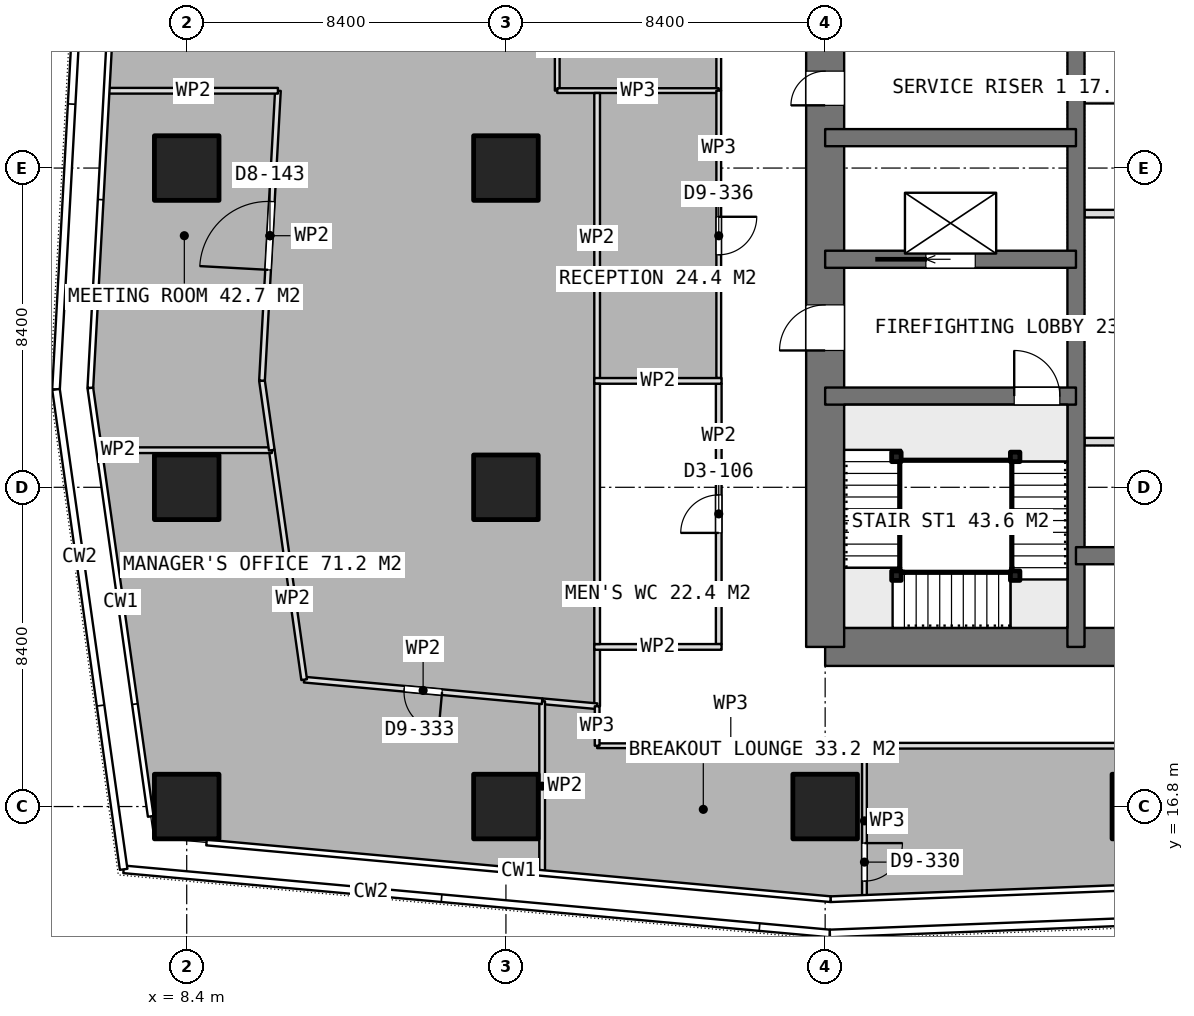
"""IFC4 building model, lengths in metres.
Left out: names, types, materials, properties, quantities, classifications, styles, units other than length and angle.
Written with IfcOpenShell. Run it as: python <this file> out.ifc"""

import sys

from ifc_helpers import new_model, si_unit, direction, frame, frame_2d, origin, origin_2d, place, context, subcontext, project, spatial, rectangle, extrude, element, fill, save


model = new_model("IFC4")
c1 = context("Model", 3, precision=1e-05, world=origin(), true_north=direction((0.0, 1.0)))
c2 = subcontext(c1, "Body", "Model", "MODEL_VIEW")
j1 = project(units=[si_unit("LENGTHUNIT", "METRE"), si_unit("PLANEANGLEUNIT", "RADIAN")], contexts=[c1])
p1 = place(None, origin())
s1 = spatial("IfcSite", under=j1, at=p1, CompositionType="ELEMENT")
p2 = place(p1, origin())
s2 = spatial("IfcBuilding", under=s1, at=p2, CompositionType="ELEMENT")
p3 = place(p2, frame((0.0, 0.0, 102.8)))
s3 = spatial("IfcBuildingStorey", under=s2, at=p3, CompositionType="ELEMENT", Elevation=102.8)
p4 = place(p3, frame((25.2, 21.0, 0.0), z_axis=(0.0, 0.0, 1.0), x_axis=(1.0, 0.0, 0.0)))
e1 = element("IfcWall", 1, at=p4, inside=s3, PredefinedType="SHEAR", context=c2, shape_type="SweptSolid", body=[
    extrude(rectangle(XDim=10.4, YDim=1.0, at=frame_2d((5.2, 0.0))), origin(), (0.0, 0.0, 1.0), 3.75),
])
p5 = place(p3, frame((25.2, 21.0, 0.0), z_axis=(0.0, 0.0, 1.0), x_axis=(0.0, 1.0, 0.0)))
e2 = element("IfcWall", 2, at=p5, inside=s3, PredefinedType="SHEAR", context=c2, shape_type="SweptSolid", body=[
    extrude(rectangle(XDim=25.2, YDim=1.0, at=frame_2d((12.6, 0.0))), origin(), (0.0, 0.0, 1.0), 3.75),
])
p6 = place(p5, frame((7.8, 0.0, 0.0)))
e3 = element("IfcOpeningElement", 3, at=p6, cuts=e2, PredefinedType="OPENING", context=c2, shape_type="SweptSolid", body=[
    extrude(rectangle(XDim=1.2, YDim=2.1, at=frame_2d((0.6, 1.05))), frame((0.0, 0.51, 0.0), z_axis=(0.0, -1.0, 0.0), x_axis=(1.0, 0.0, 0.0)), (0.0, 0.0, 1.0), 1.02),
])
p7 = place(p5, frame((14.25, 0.0, 0.0)))
e4 = element("IfcOpeningElement", 4, at=p7, cuts=e2, PredefinedType="OPENING", context=c2, shape_type="SweptSolid", body=[
    extrude(rectangle(XDim=0.9, YDim=2.1, at=frame_2d((0.45, 1.05))), frame((0.0, 0.51, 0.0), z_axis=(0.0, -1.0, 0.0), x_axis=(1.0, 0.0, 0.0)), (0.0, 0.0, 1.0), 1.02),
])
p8 = place(p5, frame((16.85, 0.0, 0.0)))
e5 = element("IfcOpeningElement", 5, at=p8, cuts=e2, PredefinedType="OPENING", context=c2, shape_type="SweptSolid", body=[
    extrude(rectangle(XDim=0.9, YDim=2.1, at=frame_2d((0.45, 1.05))), frame((0.0, 0.51, 0.0), z_axis=(0.0, -1.0, 0.0), x_axis=(1.0, 0.0, 0.0)), (0.0, 0.0, 1.0), 1.02),
])
p9 = place(p5, frame((19.025, 0.0, 0.0)))
e6 = element("IfcOpeningElement", 6, at=p9, cuts=e2, PredefinedType="OPENING", context=c2, shape_type="SweptSolid", body=[
    extrude(rectangle(XDim=1.2, YDim=2.1, at=frame_2d((0.6, 1.05))), frame((0.0, 0.51, 0.0), z_axis=(0.0, -1.0, 0.0), x_axis=(1.0, 0.0, 0.0)), (0.0, 0.0, 1.0), 1.02),
])
p10 = place(p3, frame((31.8, 21.0, 0.0), z_axis=(0.0, 0.0, 1.0), x_axis=(0.0, 1.0, 0.0)))
e7 = element("IfcWall", 7, at=p10, inside=s3, PredefinedType="SHEAR", context=c2, shape_type="SweptSolid", body=[
    extrude(rectangle(XDim=25.2, YDim=0.45, at=frame_2d((12.6, 0.0))), origin(), (0.0, 0.0, 1.0), 3.75),
])
p11 = place(p3, frame((31.8, 23.4, 0.0), z_axis=(0.0, 0.0, 1.0), x_axis=(1.0, 0.0, 0.0)))
e8 = element("IfcWall", 8, at=p11, inside=s3, PredefinedType="SHEAR", context=c2, shape_type="SweptSolid", body=[
    extrude(rectangle(XDim=3.8, YDim=0.45, at=frame_2d((1.9, 0.0))), origin(), (0.0, 0.0, 1.0), 3.75),
])
p12 = place(p3, frame((25.2, 27.6, 0.0), z_axis=(0.0, 0.0, 1.0), x_axis=(1.0, 0.0, 0.0)))
e9 = element("IfcWall", 9, at=p12, inside=s3, PredefinedType="SHEAR", context=c2, shape_type="SweptSolid", body=[
    extrude(rectangle(XDim=6.6, YDim=0.45, at=frame_2d((3.3, 0.0))), origin(), (0.0, 0.0, 1.0), 3.75),
])
p13 = place(p12, frame((4.975, 0.0, 0.0)))
e10 = element("IfcOpeningElement", 10, at=p13, cuts=e9, PredefinedType="OPENING", context=c2, shape_type="SweptSolid", body=[
    extrude(rectangle(XDim=1.2, YDim=2.1, at=frame_2d((0.6, 1.05))), frame((0.0, 0.235, 0.0), z_axis=(0.0, -1.0, 0.0), x_axis=(1.0, 0.0, 0.0)), (0.0, 0.0, 1.0), 0.47),
])
p14 = place(p3, frame((25.2, 31.2, 0.0), z_axis=(0.0, 0.0, 1.0), x_axis=(1.0, 0.0, 0.0)))
e11 = element("IfcWall", 11, at=p14, inside=s3, PredefinedType="SHEAR", context=c2, shape_type="SweptSolid", body=[
    extrude(rectangle(XDim=6.6, YDim=0.45, at=frame_2d((3.3, 0.0))), origin(), (0.0, 0.0, 1.0), 3.75),
])
p15 = place(p14, frame((2.65, 0.0, 0.0)))
e12 = element("IfcOpeningElement", 12, at=p15, cuts=e11, PredefinedType="OPENING", context=c2, shape_type="SweptSolid", body=[
    extrude(rectangle(XDim=1.3, YDim=2.1, at=frame_2d((0.65, 1.05))), frame((0.0, 0.235, 0.0), z_axis=(0.0, -1.0, 0.0), x_axis=(1.0, 0.0, 0.0)), (0.0, 0.0, 1.0), 0.47),
])
p16 = place(p3, frame((25.2, 34.4, 0.0), z_axis=(0.0, 0.0, 1.0), x_axis=(1.0, 0.0, 0.0)))
e13 = element("IfcWall", 13, at=p16, inside=s3, PredefinedType="SHEAR", context=c2, shape_type="SweptSolid", body=[
    extrude(rectangle(XDim=6.6, YDim=0.45, at=frame_2d((3.3, 0.0))), origin(), (0.0, 0.0, 1.0), 3.75),
])
for number, where, z_axis, x_axis in (
    (14, (8.4, 16.8, 0.0), (0.0, 0.0, 1.0), (1.0, 0.0, 0.0)),
    (15, (8.4, 25.2, 0.0), (0.0, 0.0, 1.0), (1.0, 0.0, 0.0)),
    (16, (8.4, 33.6, 0.0), (0.0, 0.0, 1.0), (1.0, 0.0, 0.0)),
    (17, (16.8, 16.8, 0.0), (0.0, 0.0, 1.0), (1.0, 0.0, 0.0)),
    (18, (16.8, 25.2, 0.0), (0.0, 0.0, 1.0), (1.0, 0.0, 0.0)),
    (19, (16.8, 33.6, 0.0), (0.0, 0.0, 1.0), (1.0, 0.0, 0.0)),
    (20, (25.2, 16.8, 0.0), (0.0, 0.0, 1.0), (1.0, 0.0, 0.0)),
    (21, (33.6, 16.8, 0.0), (0.0, 0.0, 1.0), (1.0, 0.0, 0.0)),
):
    element("IfcColumn", number, at=place(p3, frame(where, z_axis=z_axis, x_axis=x_axis)), inside=s3, PredefinedType="COLUMN", context=c2, shape_type="SweptSolid", body=[
        extrude(rectangle(XDim=1.7, YDim=1.7, at=origin_2d()), origin(), (0.0, 0.0, 1.0), 3.75),
    ])
for number, where, z_axis, x_axis in (
    (22, (32.025, 26.4, 0.0), (0.0, 0.0, 1.0), (1.0, 0.0, 0.0)),
    (23, (32.025, 29.4, 0.0), (0.0, 0.0, 1.0), (1.0, 0.0, 0.0)),
    (24, (32.025, 32.4, 0.0), (0.0, 0.0, 1.0), (1.0, 0.0, 0.0)),
    (25, (32.025, 35.4, 0.0), (0.0, 0.0, 1.0), (1.0, 0.0, 0.0)),
):
    element("IfcWall", number, at=place(p3, frame(where, z_axis=z_axis, x_axis=x_axis)), inside=s3, PredefinedType="PARTITIONING", context=c2, shape_type="SweptSolid", body=[
        extrude(rectangle(XDim=3.35, YDim=0.2, at=frame_2d((1.675, 0.0))), origin(), (0.0, 0.0, 1.0), 3.5),
    ])
for number, where, z_axis, x_axis in (
    (26, (19.125, 21.0, 0.0), (0.0, 0.0, 1.0), (1.0, 0.0, 0.0)),
    (27, (19.125, 28.0, 0.0), (0.0, 0.0, 1.0), (1.0, 0.0, 0.0)),
):
    element("IfcWall", number, at=place(p3, frame(where, z_axis=z_axis, x_axis=x_axis)), inside=s3, PredefinedType="PARTITIONING", context=c2, shape_type="SweptSolid", body=[
        extrude(rectangle(XDim=3.35, YDim=0.15, at=frame_2d((1.675, 0.0))), origin(), (0.0, 0.0, 1.0), 3.5),
    ])
p17 = place(p3, frame((19.2, 21.075, 0.0), z_axis=(0.0, 0.0, 1.0), x_axis=(0.0, 1.0, 0.0)))
e28 = element("IfcWall", 28, at=p17, inside=s3, PredefinedType="PARTITIONING", context=c2, shape_type="SweptSolid", body=[
    extrude(rectangle(XDim=6.85, YDim=0.15, at=frame_2d((3.425, 0.0))), origin(), (0.0, 0.0, 1.0), 3.5),
])
p18 = place(p3, frame((22.4, 21.075, 0.0), z_axis=(0.0, 0.0, 1.0), x_axis=(0.0, 1.0, 0.0)))
e29 = element("IfcWall", 29, at=p18, inside=s3, PredefinedType="PARTITIONING", context=c2, shape_type="SweptSolid", body=[
    extrude(rectangle(XDim=6.85, YDim=0.15, at=frame_2d((3.425, 0.0))), origin(), (0.0, 0.0, 1.0), 3.5),
])
p19 = place(p18, frame((2.925, 0.0, 0.0)))
e30 = element("IfcOpeningElement", 30, at=p19, cuts=e29, PredefinedType="OPENING", context=c2, shape_type="SweptSolid", body=[
    extrude(rectangle(XDim=1.0, YDim=2.1, at=frame_2d((0.5, 1.05))), frame((0.0, 0.085, 0.0), z_axis=(0.0, -1.0, 0.0), x_axis=(1.0, 0.0, 0.0)), (0.0, 0.0, 1.0), 0.17),
])
p20 = place(p3, frame((18.15, 35.638, 0.0), z_axis=(0.0, 0.0, 1.0), x_axis=(0.0, 1.0, 0.0)))
e31 = element("IfcWall", 31, at=p20, inside=s3, PredefinedType="PARTITIONING", context=c2, shape_type="SweptSolid", body=[
    extrude(rectangle(XDim=5.999, YDim=0.125, at=frame_2d((3.0, 0.0))), origin(), (0.0, 0.0, 1.0), 3.5),
])
p21 = place(p3, frame((22.4, 41.637, 0.0), z_axis=(0.0, 0.0, 1.0), x_axis=(0.0, -1.0, 0.0)))
e32 = element("IfcWall", 32, at=p21, inside=s3, PredefinedType="PARTITIONING", context=c2, shape_type="SweptSolid", body=[
    extrude(rectangle(XDim=5.999, YDim=0.125, at=frame_2d((3.0, 0.0))), origin(), (0.0, 0.0, 1.0), 3.5),
])
p22 = place(p21, frame((2.499, 0.0, 0.0)))
e33 = element("IfcOpeningElement", 33, at=p22, cuts=e32, PredefinedType="OPENING", context=c2, shape_type="SweptSolid", body=[
    extrude(rectangle(XDim=1.0, YDim=2.1, at=frame_2d((0.5, 1.05))), frame((0.0, 0.073, 0.0), z_axis=(0.0, -1.0, 0.0), x_axis=(1.0, 0.0, 0.0)), (0.0, 0.0, 1.0), 0.145),
])
p23 = place(p3, frame((22.4, 35.638, 0.0), z_axis=(0.0, 0.0, 1.0), x_axis=(-1.0, 0.0, 0.0)))
e34 = element("IfcWall", 34, at=p23, inside=s3, PredefinedType="PARTITIONING", context=c2, shape_type="SweptSolid", body=[
    extrude(rectangle(XDim=4.25, YDim=0.125, at=frame_2d((2.125, 0.0))), origin(), (0.0, 0.0, 1.0), 3.5),
])
p24 = place(p3, frame((19.2, 35.575, 0.0), z_axis=(0.0, 0.0, 1.0), x_axis=(0.0, -1.0, 0.0)))
e35 = element("IfcWall", 35, at=p24, inside=s3, PredefinedType="PARTITIONING", context=c2, shape_type="SweptSolid", body=[
    extrude(rectangle(XDim=7.65, YDim=0.15, at=frame_2d((3.825, 0.0))), origin(), (0.0, 0.0, 1.0), 3.5),
])
p25 = place(p3, frame((19.2, 21.075, 0.0), z_axis=(0.0, 0.0, 1.0), x_axis=(0.0, -1.0, 0.0)))
e36 = element("IfcWall", 36, at=p25, inside=s3, PredefinedType="PARTITIONING", context=c2, shape_type="SweptSolid", body=[
    extrude(rectangle(XDim=1.636, YDim=0.15, at=frame_2d((0.818, 0.0))), origin(), (0.0, 0.0, 1.0), 3.5),
])
p26 = place(p3, frame((19.2, 19.439, 0.0), z_axis=(0.0, 0.0, 1.0), x_axis=(-0.995920706464, 0.090232734836, 0.0)))
e37 = element("IfcWall", 37, at=p26, inside=s3, PredefinedType="PARTITIONING", context=c2, shape_type="SweptSolid", body=[
    extrude(rectangle(XDim=1.453, YDim=0.15, at=frame_2d((0.727, 0.0))), origin(), (0.0, 0.0, 1.0), 3.5),
])
p27 = place(p3, frame((17.753, 19.57, 0.0), z_axis=(0.0, 0.0, 1.0), x_axis=(0.0, -1.0, 0.0)))
e38 = element("IfcWall", 38, at=p27, inside=s3, PredefinedType="PARTITIONING", context=c2, shape_type="SweptSolid", body=[
    extrude(rectangle(XDim=4.468, YDim=0.15, at=frame_2d((2.234, 0.0))), origin(), (0.0, 0.0, 1.0), 3.5),
])
p28 = place(p3, frame((17.752, 19.57, 0.0), z_axis=(0.0, 0.0, 1.0), x_axis=(-0.995899251229, 0.090469229029, 0.0)))
e39 = element("IfcWall", 39, at=p28, inside=s3, PredefinedType="PARTITIONING", context=c2, shape_type="SweptSolid", body=[
    extrude(rectangle(XDim=6.288, YDim=0.15, at=frame_2d((3.144, 0.0))), origin(), (0.0, 0.0, 1.0), 3.5),
])
p29 = place(p28, frame((2.644, 0.0, 0.0)))
e40 = element("IfcOpeningElement", 40, at=p29, cuts=e39, PredefinedType="OPENING", context=c2, shape_type="SweptSolid", body=[
    extrude(rectangle(XDim=1.0, YDim=2.1, at=frame_2d((0.5, 1.05))), frame((0.0, 0.085, 0.0), z_axis=(0.0, -1.0, 0.0), x_axis=(1.0, 0.0, 0.0)), (0.0, 0.0, 1.0), 0.17),
])
p30 = place(p3, frame((11.49, 20.139, 0.0), z_axis=(0.0, 0.0, 1.0), x_axis=(-0.139593505482, 0.990208893733, 0.0)))
e41 = element("IfcWall", 41, at=p30, inside=s3, PredefinedType="PARTITIONING", context=c2, shape_type="SweptSolid", body=[
    extrude(rectangle(XDim=6.097, YDim=0.15, at=frame_2d((3.048, 0.0))), origin(), (0.0, 0.0, 1.0), 3.5),
])
p31 = place(p3, frame((10.639, 26.176, 0.0), z_axis=(0.0, 0.0, 1.0), x_axis=(-1.0, 0.0, 0.0)))
e42 = element("IfcWall", 42, at=p31, inside=s3, PredefinedType="PARTITIONING", context=c2, shape_type="SweptSolid", body=[
    extrude(rectangle(XDim=4.494, YDim=0.15, at=frame_2d((2.247, 0.0))), origin(), (0.0, 0.0, 1.0), 3.5),
])
p32 = place(p3, frame((10.639, 26.177, 0.0), z_axis=(0.0, 0.0, 1.0), x_axis=(-0.139570739539, 0.990212102867, 0.0)))
e43 = element("IfcWall", 43, at=p32, inside=s3, PredefinedType="PARTITIONING", context=c2, shape_type="SweptSolid", body=[
    extrude(rectangle(XDim=1.847, YDim=0.15, at=frame_2d((0.924, 0.0))), origin(), (0.0, 0.0, 1.0), 3.5),
])
p33 = place(p3, frame((10.381, 28.006, 0.0), z_axis=(0.0, 0.0, 1.0), x_axis=(0.054839895522, 0.998495160659, 0.0)))
e44 = element("IfcWall", 44, at=p33, inside=s3, PredefinedType="PARTITIONING", context=c2, shape_type="SweptSolid", body=[
    extrude(rectangle(XDim=7.639, YDim=0.15, at=frame_2d((3.82, 0.0))), origin(), (0.0, 0.0, 1.0), 3.5),
])
p34 = place(p33, frame((2.92, 0.0, 0.0)))
e45 = element("IfcOpeningElement", 45, at=p34, cuts=e44, PredefinedType="OPENING", context=c2, shape_type="SweptSolid", body=[
    extrude(rectangle(XDim=1.8, YDim=2.1, at=frame_2d((0.9, 1.05))), frame((0.0, 0.085, 0.0), z_axis=(0.0, -1.0, 0.0), x_axis=(1.0, 0.0, 0.0)), (0.0, 0.0, 1.0), 0.17),
])
p35 = place(p3, frame((10.8, 35.634, 0.0), z_axis=(0.0, 0.0, 1.0), x_axis=(-1.0, 0.0, 0.0)))
e46 = element("IfcWall", 46, at=p35, inside=s3, PredefinedType="PARTITIONING", context=c2, shape_type="SweptSolid", body=[
    extrude(rectangle(XDim=4.457, YDim=0.15, at=frame_2d((2.229, 0.0))), origin(), (0.0, 0.0, 1.0), 3.5),
])
p36 = place(p3, frame((19.2, 18.4, 0.0), z_axis=(0.0, 0.0, 1.0), x_axis=(1.0, 0.0, 0.0)))
e47 = element("IfcWall", 47, at=p36, inside=s3, PredefinedType="PARTITIONING", context=c2, shape_type="SweptSolid", body=[
    extrude(rectangle(XDim=7.034, YDim=0.125, at=frame_2d((3.517, 0.0))), origin(), (0.0, 0.0, 1.0), 3.5),
])
p37 = place(p3, frame((26.234, 18.4, 0.0), z_axis=(0.0, 0.0, 1.0), x_axis=(0.0, -1.0, 0.0)))
e48 = element("IfcWall", 48, at=p37, inside=s3, PredefinedType="PARTITIONING", context=c2, shape_type="SweptSolid", body=[
    extrude(rectangle(XDim=3.954, YDim=0.125, at=frame_2d((1.977, 0.0))), origin(), (0.0, 0.0, 1.0), 3.5),
])
p38 = place(p37, frame((2.562, 0.0, 0.0)))
e49 = element("IfcOpeningElement", 49, at=p38, cuts=e48, PredefinedType="OPENING", context=c2, shape_type="SweptSolid", body=[
    extrude(rectangle(XDim=1.0, YDim=2.1, at=frame_2d((0.5, 1.05))), frame((0.0, 0.073, 0.0), z_axis=(0.0, -1.0, 0.0), x_axis=(1.0, 0.0, 0.0)), (0.0, 0.0, 1.0), 0.145),
])
p39 = place(p3, frame((19.2, 19.439, 0.0), z_axis=(0.0, 0.0, 1.0), x_axis=(0.0, -1.0, 0.0)))
e50 = element("IfcWall", 50, at=p39, inside=s3, PredefinedType="PARTITIONING", context=c2, shape_type="SweptSolid", body=[
    extrude(rectangle(XDim=1.039, YDim=0.125, at=frame_2d((0.52, 0.0))), origin(), (0.0, 0.0, 1.0), 3.5),
])
p40 = place(p3, frame((22.4, 35.637, 0.0), z_axis=(0.0, 0.0, 1.0), x_axis=(0.0, -1.0, 0.0)))
e51 = element("IfcWall", 51, at=p40, inside=s3, PredefinedType="PARTITIONING", context=c2, shape_type="SweptSolid", body=[
    extrude(rectangle(XDim=7.562, YDim=0.125, at=frame_2d((3.781, 0.0))), origin(), (0.0, 0.0, 1.0), 3.5),
])
p41 = place(p40, frame((3.319, 0.0, 0.0)))
e52 = element("IfcOpeningElement", 52, at=p41, cuts=e51, PredefinedType="OPENING", context=c2, shape_type="SweptSolid", body=[
    extrude(rectangle(XDim=1.0, YDim=2.1, at=frame_2d((0.5, 1.05))), frame((0.0, 0.073, 0.0), z_axis=(0.0, -1.0, 0.0), x_axis=(1.0, 0.0, 0.0)), (0.0, 0.0, 1.0), 0.145),
])
p42 = place(p3, frame((26.234, 18.4, 0.0), z_axis=(0.0, 0.0, 1.0), x_axis=(1.0, 0.0, 0.0)))
e53 = element("IfcWall", 53, at=p42, inside=s3, PredefinedType="PARTITIONING", context=c2, shape_type="SweptSolid", body=[
    extrude(rectangle(XDim=23.702, YDim=0.15, at=frame_2d((11.851, 0.0))), origin(), (0.0, 0.0, 1.0), 3.5),
])
p43 = place(p42, frame((11.351, 0.0, 0.0)))
e54 = element("IfcOpeningElement", 54, at=p43, cuts=e53, PredefinedType="OPENING", context=c2, shape_type="SweptSolid", body=[
    extrude(rectangle(XDim=1.0, YDim=2.1, at=frame_2d((0.5, 1.05))), frame((0.0, 0.085, 0.0), z_axis=(0.0, -1.0, 0.0), x_axis=(1.0, 0.0, 0.0)), (0.0, 0.0, 1.0), 0.17),
])
for number, where, z_axis, x_axis in (
    (55, (30.2, 26.0, 0.0), (0.0, 0.0, 1.0), (1.0, 0.0, 0.0)),
    (56, (30.2, 22.875, 0.0), (0.0, 0.0, 1.0), (1.0, 0.0, 0.0)),
    (57, (27.075, 22.875, 0.0), (0.0, 0.0, 1.0), (1.0, 0.0, 0.0)),
    (58, (27.075, 26.0, 0.0), (0.0, 0.0, 1.0), (1.0, 0.0, 0.0)),
):
    element("IfcColumn", number, at=place(p3, frame(where, z_axis=z_axis, x_axis=x_axis)), inside=s3, PredefinedType="COLUMN", context=c2, shape_type="SweptSolid", body=[
        extrude(rectangle(XDim=0.25, YDim=0.25, at=origin_2d()), origin(), (0.0, 0.0, 1.0), 3.75),
    ])
p44 = place(p6, origin())
e59 = element("IfcDoor", 59, at=p44, inside=s3, OperationType="SINGLE_SWING_LEFT", PredefinedType="DOOR", context=c2, shape_type="SweptSolid", body=[
    extrude(rectangle(XDim=1.2, YDim=2.1, at=frame_2d((0.6, 1.05))), frame((0.0, 0.025, 0.0), z_axis=(0.0, -1.0, 0.0), x_axis=(1.0, 0.0, 0.0)), (0.0, 0.0, 1.0), 0.05),
])
fill(e3, e59)
p45 = place(p7, origin())
e60 = element("IfcDoor", 60, at=p45, inside=s3, OperationType="SINGLE_SWING_LEFT", PredefinedType="DOOR", context=c2, shape_type="SweptSolid", body=[
    extrude(rectangle(XDim=0.9, YDim=2.1, at=frame_2d((0.45, 1.05))), frame((0.0, 0.025, 0.0), z_axis=(0.0, -1.0, 0.0), x_axis=(1.0, 0.0, 0.0)), (0.0, 0.0, 1.0), 0.05),
])
fill(e4, e60)
p46 = place(p15, origin())
e61 = element("IfcDoor", 61, at=p46, inside=s3, OperationType="SLIDING_TO_LEFT", PredefinedType="USERDEFINED", context=c2, shape_type="SweptSolid", body=[
    extrude(rectangle(XDim=1.3, YDim=2.1, at=frame_2d((0.65, 1.05))), frame((0.0, 0.025, 0.0), z_axis=(0.0, -1.0, 0.0), x_axis=(1.0, 0.0, 0.0)), (0.0, 0.0, 1.0), 0.05),
])
fill(e12, e61)
p47 = place(p19, origin())
e62 = element("IfcDoor", 62, at=p47, inside=s3, OperationType="SINGLE_SWING_LEFT", PredefinedType="DOOR", context=c2, shape_type="SweptSolid", body=[
    extrude(rectangle(XDim=1.0, YDim=2.1, at=frame_2d((0.5, 1.05))), frame((0.0, 0.025, 0.0), z_axis=(0.0, -1.0, 0.0), x_axis=(1.0, 0.0, 0.0)), (0.0, 0.0, 1.0), 0.05),
])
fill(e30, e62)
p48 = place(p34, origin())
e63 = element("IfcDoor", 63, at=p48, inside=s3, OperationType="DOUBLE_DOOR_SINGLE_SWING", PredefinedType="DOOR", context=c2, shape_type="SweptSolid", body=[
    extrude(rectangle(XDim=1.8, YDim=2.1, at=frame_2d((0.9, 1.05))), frame((0.0, 0.025, 0.0), z_axis=(0.0, -1.0, 0.0), x_axis=(1.0, 0.0, 0.0)), (0.0, 0.0, 1.0), 0.05),
])
fill(e45, e63)
p49 = place(p29, origin())
e64 = element("IfcDoor", 64, at=p49, inside=s3, OperationType="SINGLE_SWING_LEFT", PredefinedType="DOOR", context=c2, shape_type="SweptSolid", body=[
    extrude(rectangle(XDim=1.0, YDim=2.1, at=frame_2d((0.5, 1.05))), frame((0.0, 0.025, 0.0), z_axis=(0.0, -1.0, 0.0), x_axis=(1.0, 0.0, 0.0)), (0.0, 0.0, 1.0), 0.05),
])
fill(e40, e64)
p50 = place(p38, origin())
e65 = element("IfcDoor", 65, at=p50, inside=s3, OperationType="SINGLE_SWING_LEFT", PredefinedType="DOOR", context=c2, shape_type="SweptSolid", body=[
    extrude(rectangle(XDim=1.0, YDim=2.1, at=frame_2d((0.5, 1.05))), frame((0.0, 0.025, 0.0), z_axis=(0.0, -1.0, 0.0), x_axis=(1.0, 0.0, 0.0)), (0.0, 0.0, 1.0), 0.05),
])
fill(e49, e65)
p51 = place(p41, origin())
e66 = element("IfcDoor", 66, at=p51, inside=s3, OperationType="SINGLE_SWING_LEFT", PredefinedType="DOOR", context=c2, shape_type="SweptSolid", body=[
    extrude(rectangle(XDim=1.0, YDim=2.1, at=frame_2d((0.5, 1.05))), frame((0.0, 0.025, 0.0), z_axis=(0.0, -1.0, 0.0), x_axis=(1.0, 0.0, 0.0)), (0.0, 0.0, 1.0), 0.05),
])
fill(e52, e66)
p52 = place(p13, origin())
e67 = element("IfcDoor", 67, at=p52, inside=s3, OperationType="SINGLE_SWING_RIGHT", PredefinedType="DOOR", context=c2, shape_type="SweptSolid", body=[
    extrude(rectangle(XDim=1.2, YDim=2.1, at=frame_2d((0.6, 1.05))), frame((0.0, 0.025, 0.0), z_axis=(0.0, -1.0, 0.0), x_axis=(1.0, 0.0, 0.0)), (0.0, 0.0, 1.0), 0.05),
])
fill(e10, e67)
save(model, sys.argv[1])
